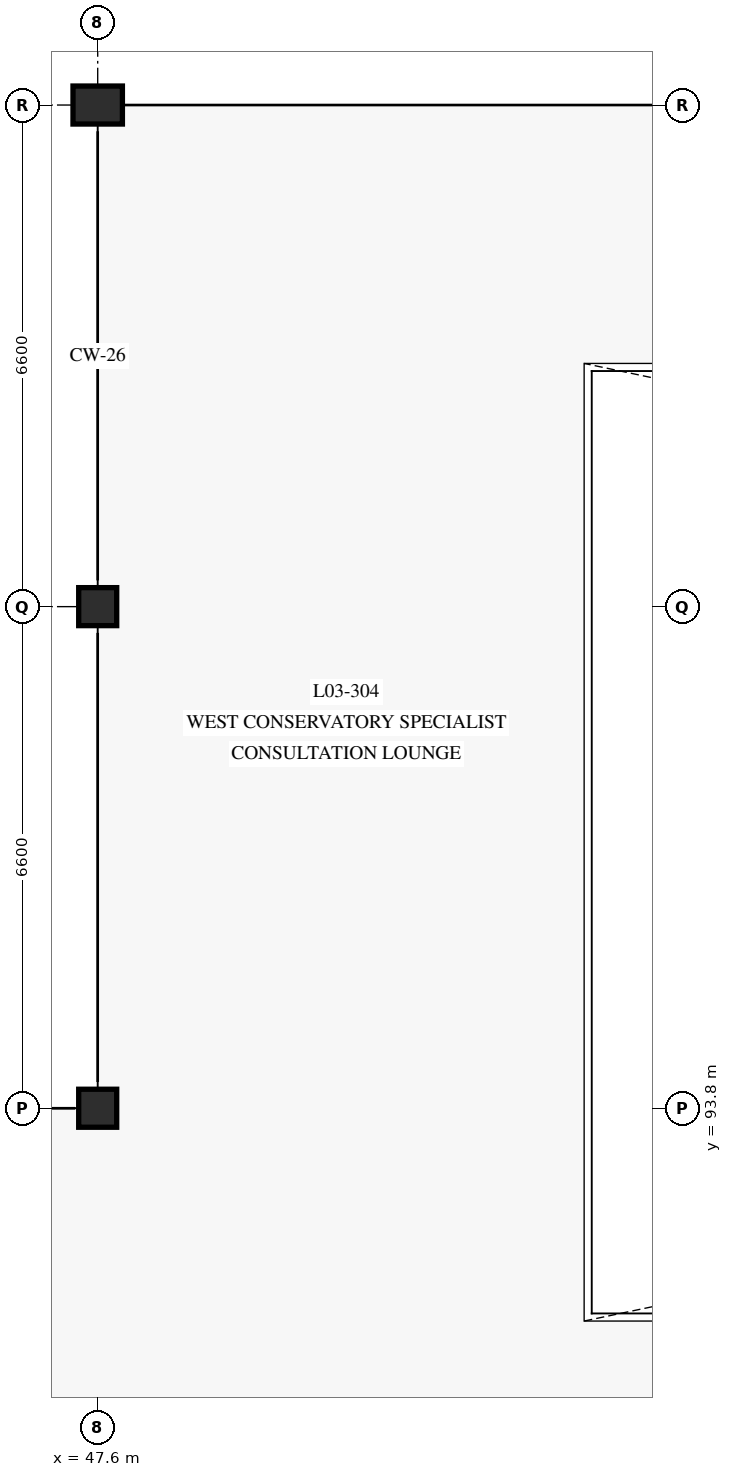
"""IFC4 building model, lengths in metres.
Left out: names, types, materials, properties, quantities, classifications, styles, units other than length and angle.
Written with IfcOpenShell. Run it as: python <this file> out.ifc"""

import sys

from ifc_helpers import new_model, si_unit, direction, frame, origin, origin_2d, place, context, subcontext, project, spatial, rectangle, extrude, element, save


model = new_model("IFC4")
c1 = context("Model", 3, precision=1e-05, world=origin(), true_north=direction((0.0, 1.0)))
c2 = subcontext(c1, "Body", "Model", "MODEL_VIEW")
j1 = project(units=[si_unit("LENGTHUNIT", "METRE"), si_unit("PLANEANGLEUNIT", "RADIAN")], contexts=[c1])
p1 = place(None, origin())
s1 = spatial("IfcSite", under=j1, at=p1, CompositionType="ELEMENT")
p2 = place(p1, origin())
s2 = spatial("IfcBuilding", under=s1, at=p2, CompositionType="ELEMENT")
p3 = place(p2, frame((0.0, 0.0, 9.3)))
s3 = spatial("IfcBuildingStorey", under=s2, at=p3, CompositionType="ELEMENT", Elevation=9.3)
for number, where, z_axis, x_axis in (
    (1, (47.6, 93.8, 0.0), (0.0, 0.0, 1.0), (1.0, 0.0, 0.0)),
    (2, (47.6, 100.4, 0.0), (0.0, 0.0, 1.0), (1.0, 0.0, 0.0)),
):
    element("IfcColumn", number, at=place(p3, frame(where, z_axis=z_axis, x_axis=x_axis)), inside=s3, PredefinedType="COLUMN", context=c2, shape_type="SweptSolid", body=[
        extrude(rectangle(XDim=0.5, YDim=0.5, at=origin_2d()), origin(), (0.0, 0.0, 1.0), 4.2),
    ])
p4 = place(p3, frame((47.6, 107.0, 0.0), z_axis=(0.0, 0.0, 1.0), x_axis=(1.0, 0.0, 0.0)))
e3 = element("IfcColumn", 3, at=p4, inside=s3, PredefinedType="COLUMN", context=c2, shape_type="SweptSolid", body=[
    extrude(rectangle(XDim=0.65, YDim=0.5, at=origin_2d()), origin(), (0.0, 0.0, 1.0), 4.2),
])
save(model, sys.argv[1])
